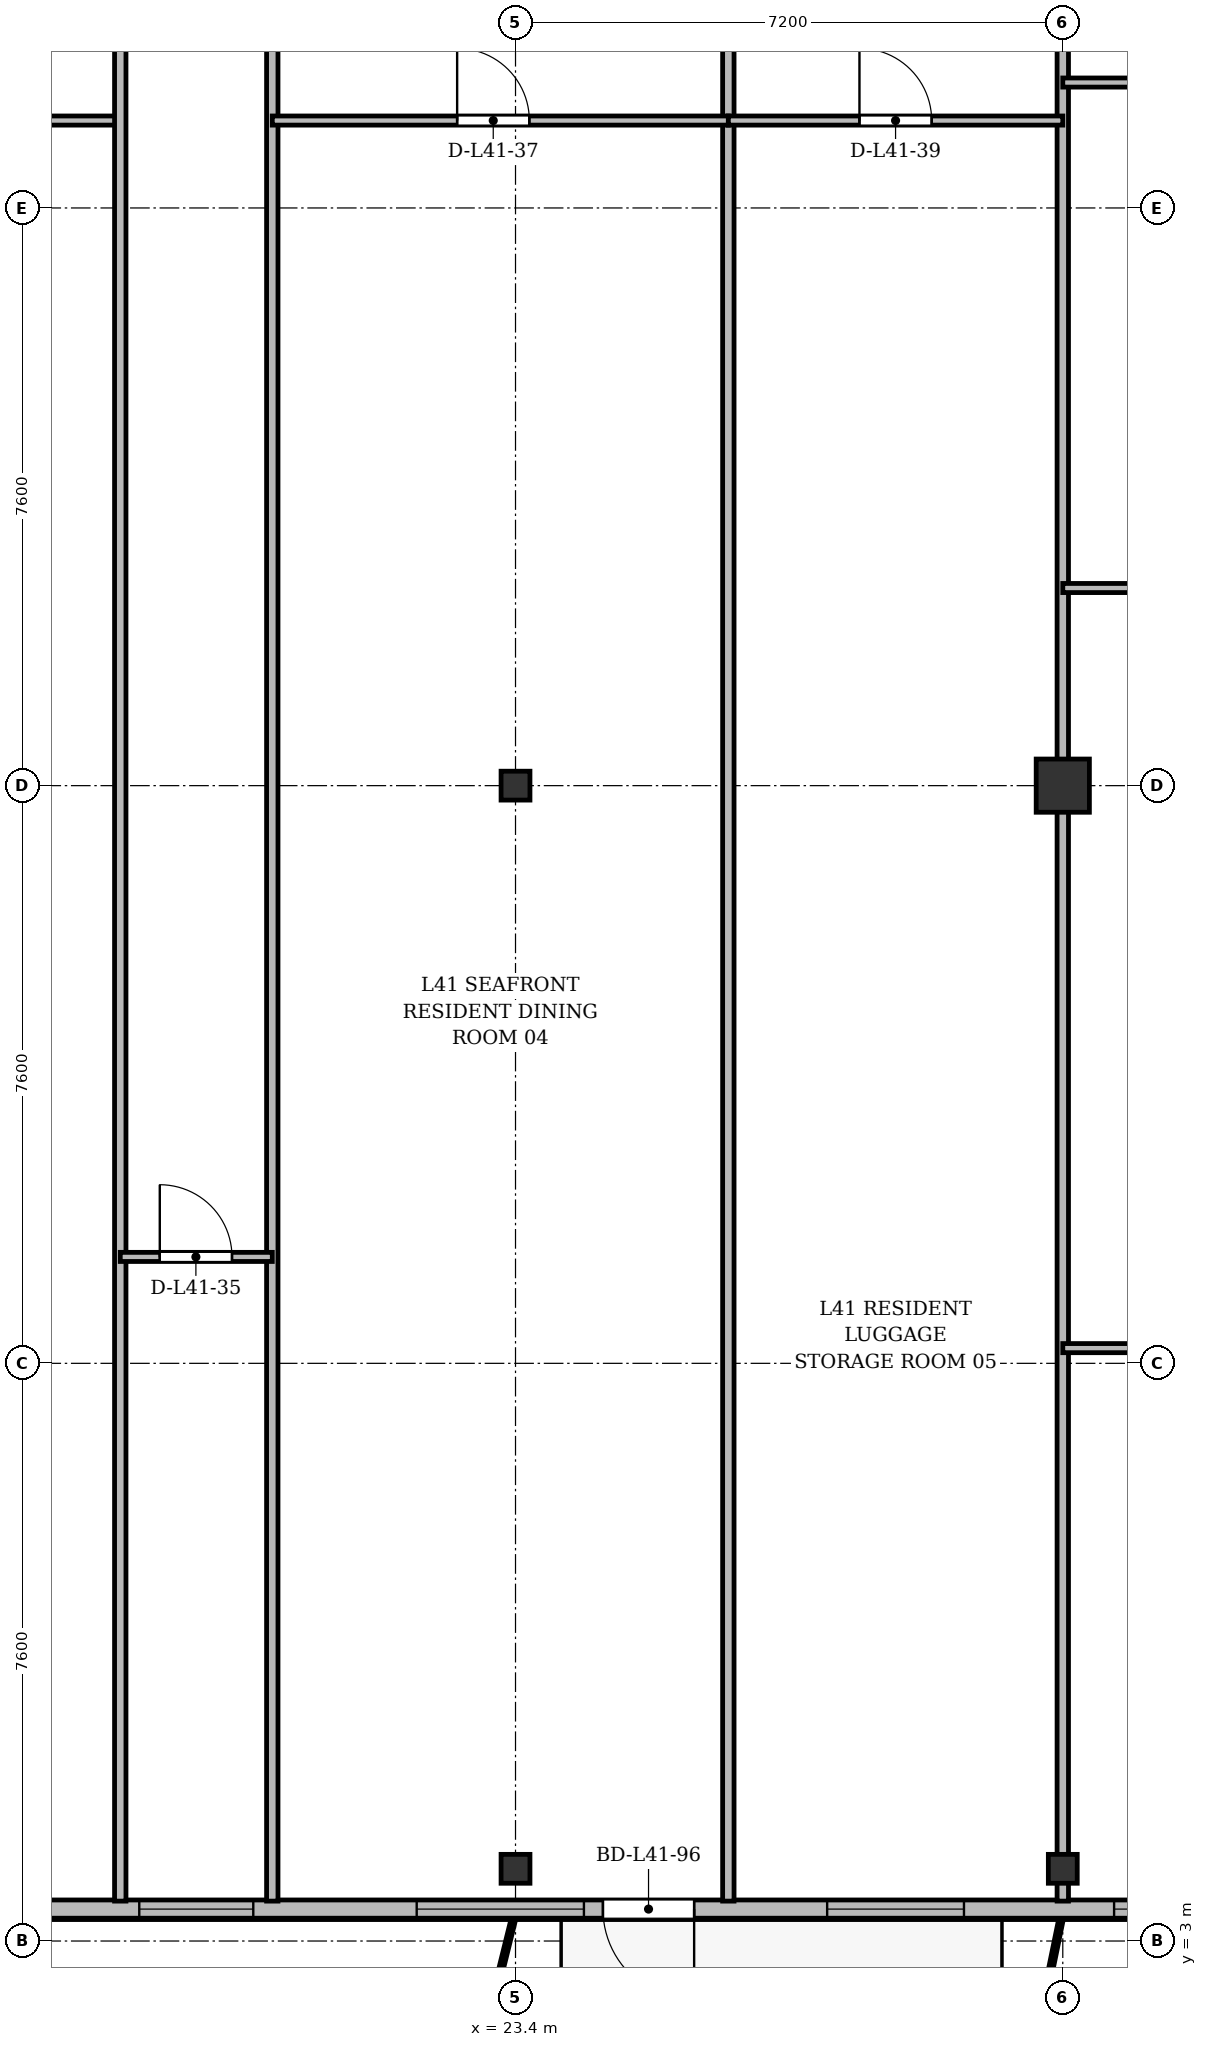
"""IFC4 building model, lengths in metres.
Left out: names, types, materials, properties, quantities, classifications, styles, units other than length and angle.
Written with IfcOpenShell. Run it as: python <this file> out.ifc"""

import sys

from ifc_helpers import new_model, si_unit, direction, frame, frame_2d, origin, origin_2d, place, context, subcontext, project, spatial, rectangle, i_section, extrude, source, transform, mapped, element, fill, save


model = new_model("IFC4")
c1 = context("Model", 3, precision=1e-05, world=origin(), true_north=direction((0.0, 1.0)))
c2 = subcontext(c1, "Body", "Model", "MODEL_VIEW")
j1 = project(units=[si_unit("LENGTHUNIT", "METRE"), si_unit("PLANEANGLEUNIT", "RADIAN")], contexts=[c1])
p1 = place(None, origin())
s1 = spatial("IfcSite", under=j1, at=p1, CompositionType="ELEMENT")
p2 = place(p1, origin())
s2 = spatial("IfcBuilding", under=s1, at=p2, CompositionType="ELEMENT")
p3 = place(p2, frame((0.0, 0.0, 157.3)))
s3 = spatial("IfcBuildingStorey", under=s2, at=p3, CompositionType="ELEMENT", Elevation=157.3)
m1 = source(origin(), c2, "Body", "SweptSolid", [
    extrude(i_section(OverallWidth=0.38, OverallDepth=0.38, WebThickness=0.02, FlangeThickness=0.03, at=origin_2d()), origin(), (0.0, 0.0, 1.0), 3.6),
])
for number, where, z_axis, x_axis in (
    (1, (23.4, 3.95, 0.0), (0.0, 0.0, 1.0), (1.0, 0.0, 0.0)),
    (2, (23.4, 18.2, 0.0), (0.0, 0.0, 1.0), (1.0, 0.0, 0.0)),
    (3, (30.6, 3.95, 0.0), (0.0, 0.0, 1.0), (1.0, 0.0, 0.0)),
):
    element("IfcColumn", number, at=place(p3, frame(where, z_axis=z_axis, x_axis=x_axis)), inside=s3, PredefinedType="COLUMN", context=c2, shape_type="MappedRepresentation", body=[
        mapped(m1, transform((0.0, 0.0, 0.0), x_axis=(1.0, 0.0, 0.0), y_axis=(0.0, 1.0, 0.0), z_axis=(0.0, 0.0, 1.0), scale=1.0)),
    ])
m2 = source(origin(), c2, "Body", "SweptSolid", [
    extrude(rectangle(XDim=0.7, YDim=0.7, at=origin_2d()), origin(), (0.0, 0.0, 1.0), 3.6),
])
p4 = place(p3, frame((30.6, 18.2, 0.0), z_axis=(0.0, 0.0, 1.0), x_axis=(1.0, 0.0, 0.0)))
e4 = element("IfcColumn", 4, at=p4, inside=s3, PredefinedType="COLUMN", context=c2, shape_type="MappedRepresentation", body=[
    mapped(m2, transform((0.0, 0.0, 0.0), x_axis=(1.0, 0.0, 0.0), y_axis=(0.0, 1.0, 0.0), z_axis=(0.0, 0.0, 1.0), scale=1.0)),
])
p5 = place(p3, frame((63.6, 3.42, 0.0), z_axis=(0.0, 0.0, 1.0), x_axis=(-1.0, 0.0, 0.0)))
e5 = element("IfcWall", 5, at=p5, inside=s3, PredefinedType="SOLIDWALL", context=c2, shape_type="SweptSolid", body=[
    extrude(rectangle(XDim=52.8, YDim=0.24, at=frame_2d((26.4, 0.0))), origin(), (0.0, 0.0, 1.0), 3.35),
])
p6 = place(p5, frame((0.295, 0.0, 0.9)))
e6 = element("IfcOpeningElement", 6, at=p6, cuts=e5, PredefinedType="OPENING", context=c2, shape_type="SweptSolid", body=[
    extrude(rectangle(XDim=1.5, YDim=1.75, at=frame_2d((0.75, 0.875))), frame((0.0, 0.13, 0.0), z_axis=(0.0, -1.0, 0.0), x_axis=(1.0, 0.0, 0.0)), (0.0, 0.0, 1.0), 0.26),
])
p7 = place(p5, frame((3.95, 0.0, 0.9)))
e7 = element("IfcOpeningElement", 7, at=p7, cuts=e5, PredefinedType="OPENING", context=c2, shape_type="SweptSolid", body=[
    extrude(rectangle(XDim=1.5, YDim=1.75, at=frame_2d((0.75, 0.875))), frame((0.0, 0.13, 0.0), z_axis=(0.0, -1.0, 0.0), x_axis=(1.0, 0.0, 0.0)), (0.0, 0.0, 1.0), 0.26),
])
p8 = place(p5, frame((7.635, 0.0, 0.0)))
e8 = element("IfcOpeningElement", 8, at=p8, cuts=e5, PredefinedType="OPENING", context=c2, shape_type="SweptSolid", body=[
    extrude(rectangle(XDim=1.2, YDim=2.2, at=frame_2d((0.6, 1.1))), frame((0.0, 0.13, 0.0), z_axis=(0.0, -1.0, 0.0), x_axis=(1.0, 0.0, 0.0)), (0.0, 0.0, 1.0), 0.26),
])
p9 = place(p5, frame((9.775, 0.0, 0.9)))
e9 = element("IfcOpeningElement", 9, at=p9, cuts=e5, PredefinedType="OPENING", context=c2, shape_type="SweptSolid", body=[
    extrude(rectangle(XDim=1.65, YDim=1.85, at=frame_2d((0.825, 0.925))), frame((0.0, 0.13, 0.0), z_axis=(0.0, -1.0, 0.0), x_axis=(1.0, 0.0, 0.0)), (0.0, 0.0, 1.0), 0.26),
])
p10 = place(p5, frame((12.1, 0.0, 0.9)))
e10 = element("IfcOpeningElement", 10, at=p10, cuts=e5, PredefinedType="OPENING", context=c2, shape_type="SweptSolid", body=[
    extrude(rectangle(XDim=1.8, YDim=1.8, at=frame_2d((0.9, 0.9))), frame((0.0, 0.13, 0.0), z_axis=(0.0, -1.0, 0.0), x_axis=(1.0, 0.0, 0.0)), (0.0, 0.0, 1.0), 0.26),
])
p11 = place(p5, frame((15.9, 0.0, 0.9)))
e11 = element("IfcOpeningElement", 11, at=p11, cuts=e5, PredefinedType="OPENING", context=c2, shape_type="SweptSolid", body=[
    extrude(rectangle(XDim=2.2, YDim=1.8, at=frame_2d((1.1, 0.9))), frame((0.0, 0.13, 0.0), z_axis=(0.0, -1.0, 0.0), x_axis=(1.0, 0.0, 0.0)), (0.0, 0.0, 1.0), 0.26),
])
p12 = place(p5, frame((22.65, 0.0, 0.9)))
e12 = element("IfcOpeningElement", 12, at=p12, cuts=e5, PredefinedType="OPENING", context=c2, shape_type="SweptSolid", body=[
    extrude(rectangle(XDim=1.5, YDim=1.75, at=frame_2d((0.75, 0.875))), frame((0.0, 0.13, 0.0), z_axis=(0.0, -1.0, 0.0), x_axis=(1.0, 0.0, 0.0)), (0.0, 0.0, 1.0), 0.26),
])
p13 = place(p5, frame((27.5, 0.0, 0.9)))
e13 = element("IfcOpeningElement", 13, at=p13, cuts=e5, PredefinedType="OPENING", context=c2, shape_type="SweptSolid", body=[
    extrude(rectangle(XDim=2.0, YDim=1.95, at=frame_2d((1.0, 0.975))), frame((0.0, 0.13, 0.0), z_axis=(0.0, -1.0, 0.0), x_axis=(1.0, 0.0, 0.0)), (0.0, 0.0, 1.0), 0.26),
])
p14 = place(p5, frame((30.675, 0.0, 0.9)))
e14 = element("IfcOpeningElement", 14, at=p14, cuts=e5, PredefinedType="OPENING", context=c2, shape_type="SweptSolid", body=[
    extrude(rectangle(XDim=1.65, YDim=1.85, at=frame_2d((0.825, 0.925))), frame((0.0, 0.13, 0.0), z_axis=(0.0, -1.0, 0.0), x_axis=(1.0, 0.0, 0.0)), (0.0, 0.0, 1.0), 0.26),
])
p15 = place(p5, frame((34.3, 0.0, 0.9)))
e15 = element("IfcOpeningElement", 15, at=p15, cuts=e5, PredefinedType="OPENING", context=c2, shape_type="SweptSolid", body=[
    extrude(rectangle(XDim=1.8, YDim=1.8, at=frame_2d((0.9, 0.9))), frame((0.0, 0.13, 0.0), z_axis=(0.0, -1.0, 0.0), x_axis=(1.0, 0.0, 0.0)), (0.0, 0.0, 1.0), 0.26),
])
p16 = place(p5, frame((39.3, 0.0, 0.9)))
e16 = element("IfcOpeningElement", 16, at=p16, cuts=e5, PredefinedType="OPENING", context=c2, shape_type="SweptSolid", body=[
    extrude(rectangle(XDim=2.2, YDim=1.8, at=frame_2d((1.1, 0.9))), frame((0.0, 0.13, 0.0), z_axis=(0.0, -1.0, 0.0), x_axis=(1.0, 0.0, 0.0)), (0.0, 0.0, 1.0), 0.26),
])
p17 = place(p5, frame((43.65, 0.0, 0.9)))
e17 = element("IfcOpeningElement", 17, at=p17, cuts=e5, PredefinedType="OPENING", context=c2, shape_type="SweptSolid", body=[
    extrude(rectangle(XDim=1.5, YDim=1.75, at=frame_2d((0.75, 0.875))), frame((0.0, 0.13, 0.0), z_axis=(0.0, -1.0, 0.0), x_axis=(1.0, 0.0, 0.0)), (0.0, 0.0, 1.0), 0.26),
])
p18 = place(p5, frame((47.1, 0.0, 0.9)))
e18 = element("IfcOpeningElement", 18, at=p18, cuts=e5, PredefinedType="OPENING", context=c2, shape_type="SweptSolid", body=[
    extrude(rectangle(XDim=2.0, YDim=1.95, at=frame_2d((1.0, 0.975))), frame((0.0, 0.13, 0.0), z_axis=(0.0, -1.0, 0.0), x_axis=(1.0, 0.0, 0.0)), (0.0, 0.0, 1.0), 0.26),
])
p19 = place(p5, frame((51.005, 0.0, 0.9)))
e19 = element("IfcOpeningElement", 19, at=p19, cuts=e5, PredefinedType="OPENING", context=c2, shape_type="SweptSolid", body=[
    extrude(rectangle(XDim=1.5, YDim=1.75, at=frame_2d((0.75, 0.875))), frame((0.0, 0.13, 0.0), z_axis=(0.0, -1.0, 0.0), x_axis=(1.0, 0.0, 0.0)), (0.0, 0.0, 1.0), 0.26),
])
p20 = place(p5, frame((37.85, 0.0, 0.0)))
e20 = element("IfcOpeningElement", 20, at=p20, cuts=e5, PredefinedType="OPENING", context=c2, shape_type="SweptSolid", body=[
    extrude(rectangle(XDim=1.2, YDim=2.2, at=frame_2d((0.6, 1.1))), frame((0.0, 0.13, 0.0), z_axis=(0.0, -1.0, 0.0), x_axis=(1.0, 0.0, 0.0)), (0.0, 0.0, 1.0), 0.26),
])
p21 = place(p3, frame((26.2, 3.525, 0.0), z_axis=(0.0, 0.0, 1.0), x_axis=(0.0, 1.0, 0.0)))
e21 = element("IfcWall", 21, at=p21, inside=s3, PredefinedType="PARTITIONING", context=c2, shape_type="SweptSolid", body=[
    extrude(rectangle(XDim=27.275, YDim=0.15, at=frame_2d((13.638, 0.0))), origin(), (0.0, 0.0, 1.0), 2.75),
])
p22 = place(p3, frame((30.6, 3.525, 0.0), z_axis=(0.0, 0.0, 1.0), x_axis=(0.0, 1.0, 0.0)))
e22 = element("IfcWall", 22, at=p22, inside=s3, PredefinedType="PARTITIONING", context=c2, shape_type="SweptSolid", body=[
    extrude(rectangle(XDim=27.275, YDim=0.15, at=frame_2d((13.638, 0.0))), origin(), (0.0, 0.0, 1.0), 2.85),
])
p23 = place(p3, frame((12.8, 26.95, 0.0), z_axis=(0.0, 0.0, 1.0), x_axis=(1.0, 0.0, 0.0)))
e23 = element("IfcWall", 23, at=p23, inside=s3, PredefinedType="PARTITIONING", context=c2, shape_type="SweptSolid", body=[
    extrude(rectangle(XDim=5.4, YDim=0.12, at=frame_2d((2.7, 0.0))), origin(), (0.0, 0.0, 1.0), 2.85),
])
p24 = place(p23, frame((2.225, 0.0, 0.0)))
e24 = element("IfcOpeningElement", 24, at=p24, cuts=e23, PredefinedType="OPENING", context=c2, shape_type="SweptSolid", body=[
    extrude(rectangle(XDim=0.95, YDim=2.15, at=frame_2d((0.475, 1.075))), frame((0.0, 0.07, 0.0), z_axis=(0.0, -1.0, 0.0), x_axis=(1.0, 0.0, 0.0)), (0.0, 0.0, 1.0), 0.14),
])
for number, where, z_axis, x_axis in (
    (25, (18.2, 3.525, 0.0), (0.0, 0.0, 1.0), (0.0, 1.0, 0.0)),
    (26, (20.2, 3.525, 0.0), (0.0, 0.0, 1.0), (0.0, 1.0, 0.0)),
):
    element("IfcWall", number, at=place(p3, frame(where, z_axis=z_axis, x_axis=x_axis)), inside=s3, PredefinedType="PARTITIONING", context=c2, shape_type="SweptSolid", body=[
        extrude(rectangle(XDim=27.275, YDim=0.15, at=frame_2d((13.638, 0.0))), origin(), (0.0, 0.0, 1.0), 2.75),
    ])
p25 = place(p3, frame((18.2, 12.0, 0.0), z_axis=(0.0, 0.0, 1.0), x_axis=(1.0, 0.0, 0.0)))
e27 = element("IfcWall", 27, at=p25, inside=s3, PredefinedType="PARTITIONING", context=c2, shape_type="SweptSolid", body=[
    extrude(rectangle(XDim=2.0, YDim=0.12, at=frame_2d((1.0, 0.0))), origin(), (0.0, 0.0, 1.0), 3.35),
])
p26 = place(p25, frame((0.52, 0.0, 0.0)))
e28 = element("IfcOpeningElement", 28, at=p26, cuts=e27, PredefinedType="OPENING", context=c2, shape_type="SweptSolid", body=[
    extrude(rectangle(XDim=0.95, YDim=2.15, at=frame_2d((0.475, 1.075))), frame((0.0, 0.07, 0.0), z_axis=(0.0, -1.0, 0.0), x_axis=(1.0, 0.0, 0.0)), (0.0, 0.0, 1.0), 0.14),
])
p27 = place(p3, frame((20.2, 26.95, 0.0), z_axis=(0.0, 0.0, 1.0), x_axis=(1.0, 0.0, 0.0)))
e29 = element("IfcWall", 29, at=p27, inside=s3, PredefinedType="PARTITIONING", context=c2, shape_type="SweptSolid", body=[
    extrude(rectangle(XDim=6.0, YDim=0.12, at=frame_2d((3.0, 0.0))), origin(), (0.0, 0.0, 1.0), 2.85),
])
p28 = place(p27, frame((2.432, 0.0, 0.0)))
e30 = element("IfcOpeningElement", 30, at=p28, cuts=e29, PredefinedType="OPENING", context=c2, shape_type="SweptSolid", body=[
    extrude(rectangle(XDim=0.95, YDim=2.15, at=frame_2d((0.475, 1.075))), frame((0.0, 0.07, 0.0), z_axis=(0.0, -1.0, 0.0), x_axis=(1.0, 0.0, 0.0)), (0.0, 0.0, 1.0), 0.14),
])
p29 = place(p3, frame((26.2, 26.95, 0.0), z_axis=(0.0, 0.0, 1.0), x_axis=(1.0, 0.0, 0.0)))
e31 = element("IfcWall", 31, at=p29, inside=s3, PredefinedType="PARTITIONING", context=c2, shape_type="SweptSolid", body=[
    extrude(rectangle(XDim=4.4, YDim=0.12, at=frame_2d((2.2, 0.0))), origin(), (0.0, 0.0, 1.0), 2.85),
])
p30 = place(p29, frame((1.725, 0.0, 0.0)))
e32 = element("IfcOpeningElement", 32, at=p30, cuts=e31, PredefinedType="OPENING", context=c2, shape_type="SweptSolid", body=[
    extrude(rectangle(XDim=0.95, YDim=2.15, at=frame_2d((0.475, 1.075))), frame((0.0, 0.07, 0.0), z_axis=(0.0, -1.0, 0.0), x_axis=(1.0, 0.0, 0.0)), (0.0, 0.0, 1.0), 0.14),
])
p31 = place(p3, frame((30.6, 20.8, 0.0), z_axis=(0.0, 0.0, 1.0), x_axis=(1.0, 0.0, 0.0)))
e33 = element("IfcWall", 33, at=p31, inside=s3, PredefinedType="PARTITIONING", context=c2, shape_type="SweptSolid", body=[
    extrude(rectangle(XDim=6.0, YDim=0.12, at=frame_2d((3.0, 0.0))), origin(), (0.0, 0.0, 1.0), 2.85),
])
p32 = place(p31, frame((2.432, 0.0, 0.0)))
e34 = element("IfcOpeningElement", 34, at=p32, cuts=e33, PredefinedType="OPENING", context=c2, shape_type="SweptSolid", body=[
    extrude(rectangle(XDim=0.95, YDim=2.15, at=frame_2d((0.475, 1.075))), frame((0.0, 0.07, 0.0), z_axis=(0.0, -1.0, 0.0), x_axis=(1.0, 0.0, 0.0)), (0.0, 0.0, 1.0), 0.14),
])
p33 = place(p3, frame((30.6, 27.45, 0.0), z_axis=(0.0, 0.0, 1.0), x_axis=(1.0, 0.0, 0.0)))
e35 = element("IfcWall", 35, at=p33, inside=s3, PredefinedType="PARTITIONING", context=c2, shape_type="SweptSolid", body=[
    extrude(rectangle(XDim=2.09, YDim=0.12, at=frame_2d((1.045, 0.0))), origin(), (0.0, 0.0, 1.0), 2.85),
])
p34 = place(p3, frame((30.6, 10.8, 0.0), z_axis=(0.0, 0.0, 1.0), x_axis=(1.0, 0.0, 0.0)))
e36 = element("IfcWall", 36, at=p34, inside=s3, PredefinedType="PARTITIONING", context=c2, shape_type="SweptSolid", body=[
    extrude(rectangle(XDim=3.0, YDim=0.12, at=frame_2d((1.5, 0.0))), origin(), (0.0, 0.0, 1.0), 2.85),
])
p35 = place(p34, frame((1.025, 0.0, 0.0)))
e37 = element("IfcOpeningElement", 37, at=p35, cuts=e36, PredefinedType="OPENING", context=c2, shape_type="SweptSolid", body=[
    extrude(rectangle(XDim=0.95, YDim=2.15, at=frame_2d((0.475, 1.075))), frame((0.0, 0.07, 0.0), z_axis=(0.0, -1.0, 0.0), x_axis=(1.0, 0.0, 0.0)), (0.0, 0.0, 1.0), 0.14),
])
m3 = source(origin(), c2, "Body", "SweptSolid", [
    extrude(rectangle(XDim=1.65, YDim=1.85, at=frame_2d((0.825, 0.925))), frame((0.0, 0.03, 0.0), z_axis=(0.0, -1.0, 0.0), x_axis=(1.0, 0.0, 0.0)), (0.0, 0.0, 1.0), 0.06),
])
p36 = place(p14, origin())
e38 = element("IfcWindow", 38, at=p36, inside=s3, PartitioningType="SINGLE_PANEL", PredefinedType="WINDOW", context=c2, shape_type="MappedRepresentation", body=[
    mapped(m3, transform((0.0, 0.0, 0.0), x_axis=(1.0, 0.0, 0.0), y_axis=(0.0, 1.0, 0.0), z_axis=(0.0, 0.0, 1.0), scale=1.0)),
])
fill(e14, e38)
m4 = source(origin(), c2, "Body", "SweptSolid", [
    extrude(rectangle(XDim=1.8, YDim=1.8, at=frame_2d((0.9, 0.9))), frame((0.0, 0.03, 0.0), z_axis=(0.0, -1.0, 0.0), x_axis=(1.0, 0.0, 0.0)), (0.0, 0.0, 1.0), 0.06),
])
p37 = place(p15, origin())
e39 = element("IfcWindow", 39, at=p37, inside=s3, PartitioningType="SINGLE_PANEL", PredefinedType="WINDOW", context=c2, shape_type="MappedRepresentation", body=[
    mapped(m4, transform((0.0, 0.0, 0.0), x_axis=(1.0, 0.0, 0.0), y_axis=(0.0, 1.0, 0.0), z_axis=(0.0, 0.0, 1.0), scale=1.0)),
])
fill(e15, e39)
m5 = source(origin(), c2, "Body", "SweptSolid", [
    extrude(rectangle(XDim=2.2, YDim=1.8, at=frame_2d((1.1, 0.9))), frame((0.0, 0.03, 0.0), z_axis=(0.0, -1.0, 0.0), x_axis=(1.0, 0.0, 0.0)), (0.0, 0.0, 1.0), 0.06),
])
p38 = place(p16, origin())
e40 = element("IfcWindow", 40, at=p38, inside=s3, PartitioningType="SINGLE_PANEL", PredefinedType="WINDOW", context=c2, shape_type="MappedRepresentation", body=[
    mapped(m5, transform((0.0, 0.0, 0.0), x_axis=(1.0, 0.0, 0.0), y_axis=(0.0, 1.0, 0.0), z_axis=(0.0, 0.0, 1.0), scale=1.0)),
])
fill(e16, e40)
m6 = source(origin(), c2, "Body", "SweptSolid", [
    extrude(rectangle(XDim=1.5, YDim=1.75, at=frame_2d((0.75, 0.875))), frame((0.0, 0.03, 0.0), z_axis=(0.0, -1.0, 0.0), x_axis=(1.0, 0.0, 0.0)), (0.0, 0.0, 1.0), 0.06),
])
p39 = place(p17, origin())
e41 = element("IfcWindow", 41, at=p39, inside=s3, PartitioningType="SINGLE_PANEL", PredefinedType="WINDOW", context=c2, shape_type="MappedRepresentation", body=[
    mapped(m6, transform((0.0, 0.0, 0.0), x_axis=(1.0, 0.0, 0.0), y_axis=(0.0, 1.0, 0.0), z_axis=(0.0, 0.0, 1.0), scale=1.0)),
])
fill(e17, e41)
m7 = source(origin(), c2, "Body", "SweptSolid", [
    extrude(rectangle(XDim=1.2, YDim=2.2, at=frame_2d((0.6, 1.1))), frame((0.0, 0.025, 0.0), z_axis=(0.0, -1.0, 0.0), x_axis=(1.0, 0.0, 0.0)), (0.0, 0.0, 1.0), 0.05),
])
p40 = place(p20, origin())
e42 = element("IfcDoor", 42, at=p40, inside=s3, OperationType="SINGLE_SWING_LEFT", PredefinedType="DOOR", context=c2, shape_type="MappedRepresentation", body=[
    mapped(m7, transform((0.0, 0.0, 0.0), x_axis=(1.0, 0.0, 0.0), y_axis=(0.0, 1.0, 0.0), z_axis=(0.0, 0.0, 1.0), scale=1.0)),
])
fill(e20, e42)
m8 = source(origin(), c2, "Body", "SweptSolid", [
    extrude(rectangle(XDim=0.95, YDim=2.15, at=frame_2d((0.475, 1.075))), frame((0.0, 0.025, 0.0), z_axis=(0.0, -1.0, 0.0), x_axis=(1.0, 0.0, 0.0)), (0.0, 0.0, 1.0), 0.05),
])
p41 = place(p26, origin())
e43 = element("IfcDoor", 43, at=p41, inside=s3, OperationType="SINGLE_SWING_LEFT", PredefinedType="DOOR", context=c2, shape_type="MappedRepresentation", body=[
    mapped(m8, transform((0.0, 0.0, 0.0), x_axis=(1.0, 0.0, 0.0), y_axis=(0.0, 1.0, 0.0), z_axis=(0.0, 0.0, 1.0), scale=1.0)),
])
fill(e28, e43)
p42 = place(p28, origin())
e44 = element("IfcDoor", 44, at=p42, inside=s3, OperationType="SINGLE_SWING_LEFT", PredefinedType="DOOR", context=c2, shape_type="MappedRepresentation", body=[
    mapped(m8, transform((0.0, 0.0, 0.0), x_axis=(1.0, 0.0, 0.0), y_axis=(0.0, 1.0, 0.0), z_axis=(0.0, 0.0, 1.0), scale=1.0)),
])
fill(e30, e44)
p43 = place(p30, origin())
e45 = element("IfcDoor", 45, at=p43, inside=s3, OperationType="SINGLE_SWING_LEFT", PredefinedType="DOOR", context=c2, shape_type="MappedRepresentation", body=[
    mapped(m8, transform((0.0, 0.0, 0.0), x_axis=(1.0, 0.0, 0.0), y_axis=(0.0, 1.0, 0.0), z_axis=(0.0, 0.0, 1.0), scale=1.0)),
])
fill(e32, e45)
save(model, sys.argv[1])
